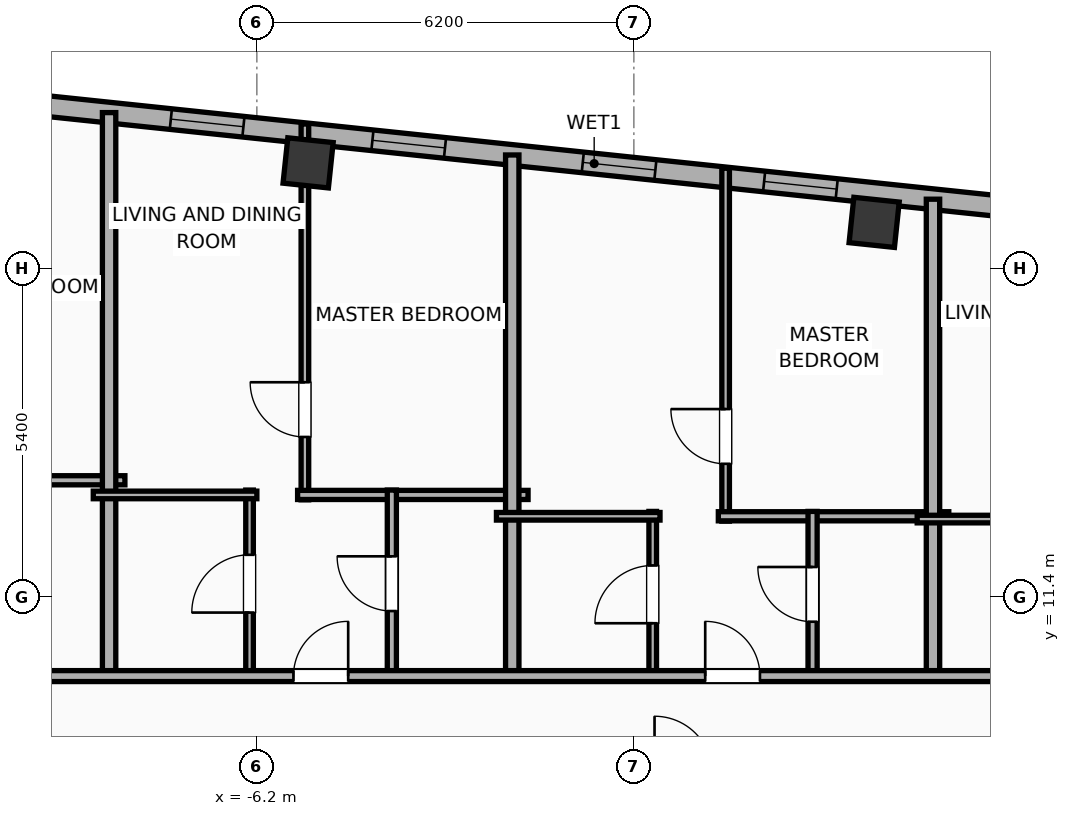
"""IFC4 building model, lengths in metres.
Left out: names, types, materials, properties, quantities, classifications, styles, units other than length and angle.
Written with IfcOpenShell. Run it as: python <this file> out.ifc"""

import sys

from ifc_helpers import new_model, si_unit, direction, frame, frame_2d, origin, origin_2d, place, context, subcontext, project, spatial, rectangle, hollow_rectangle, extrude, element, fill, save


model = new_model("IFC4")
c1 = context("Model", 3, precision=1e-05, world=origin(), true_north=direction((0.0, 1.0)))
c2 = subcontext(c1, "Body", "Model", "MODEL_VIEW")
j1 = project(units=[si_unit("LENGTHUNIT", "METRE"), si_unit("PLANEANGLEUNIT", "RADIAN")], contexts=[c1])
p1 = place(None, origin())
s1 = spatial("IfcSite", under=j1, at=p1, CompositionType="ELEMENT")
p2 = place(p1, origin())
s2 = spatial("IfcBuilding", under=s1, at=p2, CompositionType="ELEMENT")
p3 = place(p2, frame((0.0, 0.0, 299.0)))
s3 = spatial("IfcBuildingStorey", under=s2, at=p3, CompositionType="ELEMENT", Elevation=299.0)
for number, where, z_axis, x_axis in (
    (1, (3.952, 17.561, 0.0), (0.0, 0.0, 1.0), (0.995, -0.105, 0.0)),
    (2, (-5.357, 18.54, 0.0), (0.0, 0.0, 1.0), (0.995, -0.105, 0.0)),
):
    element("IfcColumn", number, at=place(p3, frame(where, z_axis=z_axis, x_axis=x_axis)), inside=s3, PredefinedType="COLUMN", context=c2, shape_type="SweptSolid", body=[
        extrude(hollow_rectangle(XDim=0.75, YDim=0.75, WallThickness=0.025, at=origin_2d()), origin(), (0.0, 0.0, 1.0), 3.9),
    ])
p4 = place(p3, frame((-23.908, 20.972, 0.0), z_axis=(0.0, 0.0, 1.0), x_axis=(0.994521888554, -0.104528528102, 0.0)))
e3 = element("IfcWall", 3, at=p4, inside=s3, PredefinedType="ELEMENTEDWALL", context=c2, shape_type="SweptSolid", body=[
    extrude(rectangle(XDim=46.766, YDim=0.34, at=frame_2d((23.383, 0.0))), origin(), (0.0, 0.0, 1.0), 3.635),
])
p5 = place(p4, frame((5.644, 0.0, 0.65)))
e4 = element("IfcOpeningElement", 4, at=p5, cuts=e3, PredefinedType="OPENING", context=c2, shape_type="SweptSolid", body=[
    extrude(rectangle(XDim=2.6, YDim=2.45, at=frame_2d((1.3, 1.225))), frame((0.0, 0.18, 0.0), z_axis=(0.0, -1.0, 0.0), x_axis=(1.0, 0.0, 0.0)), (0.0, 0.0, 1.0), 0.36),
])
p6 = place(p4, frame((3.05, 0.0, 0.75)))
e5 = element("IfcOpeningElement", 5, at=p6, cuts=e3, PredefinedType="OPENING", context=c2, shape_type="SweptSolid", body=[
    extrude(rectangle(XDim=1.2, YDim=2.05, at=frame_2d((0.6, 1.025))), frame((0.0, 0.18, 0.0), z_axis=(0.0, -1.0, 0.0), x_axis=(1.0, 0.0, 0.0)), (0.0, 0.0, 1.0), 0.36),
])
p7 = place(p4, frame((9.957, 0.0, 0.75)))
e6 = element("IfcOpeningElement", 6, at=p7, cuts=e3, PredefinedType="OPENING", context=c2, shape_type="SweptSolid", body=[
    extrude(rectangle(XDim=1.2, YDim=2.05, at=frame_2d((0.6, 1.025))), frame((0.0, 0.18, 0.0), z_axis=(0.0, -1.0, 0.0), x_axis=(1.0, 0.0, 0.0)), (0.0, 0.0, 1.0), 0.36),
])
p8 = place(p4, frame((13.05, 0.0, 0.75)))
e7 = element("IfcOpeningElement", 7, at=p8, cuts=e3, PredefinedType="OPENING", context=c2, shape_type="SweptSolid", body=[
    extrude(rectangle(XDim=1.2, YDim=2.05, at=frame_2d((0.6, 1.025))), frame((0.0, 0.18, 0.0), z_axis=(0.0, -1.0, 0.0), x_axis=(1.0, 0.0, 0.0)), (0.0, 0.0, 1.0), 0.36),
])
p9 = place(p4, frame((16.383, 0.0, 0.75)))
e8 = element("IfcOpeningElement", 8, at=p9, cuts=e3, PredefinedType="OPENING", context=c2, shape_type="SweptSolid", body=[
    extrude(rectangle(XDim=1.2, YDim=2.05, at=frame_2d((0.6, 1.025))), frame((0.0, 0.18, 0.0), z_axis=(0.0, -1.0, 0.0), x_axis=(1.0, 0.0, 0.0)), (0.0, 0.0, 1.0), 0.36),
])
p10 = place(p4, frame((19.716, 0.0, 0.75)))
e9 = element("IfcOpeningElement", 9, at=p10, cuts=e3, PredefinedType="OPENING", context=c2, shape_type="SweptSolid", body=[
    extrude(rectangle(XDim=1.2, YDim=2.05, at=frame_2d((0.6, 1.025))), frame((0.0, 0.18, 0.0), z_axis=(0.0, -1.0, 0.0), x_axis=(1.0, 0.0, 0.0)), (0.0, 0.0, 1.0), 0.36),
])
p11 = place(p4, frame((23.195, 0.0, 0.75)))
e10 = element("IfcOpeningElement", 10, at=p11, cuts=e3, PredefinedType="OPENING", context=c2, shape_type="SweptSolid", body=[
    extrude(rectangle(XDim=1.2, YDim=2.05, at=frame_2d((0.6, 1.025))), frame((0.0, 0.18, 0.0), z_axis=(0.0, -1.0, 0.0), x_axis=(1.0, 0.0, 0.0)), (0.0, 0.0, 1.0), 0.36),
])
p12 = place(p4, frame((26.194, 0.0, 0.75)))
e11 = element("IfcOpeningElement", 11, at=p12, cuts=e3, PredefinedType="OPENING", context=c2, shape_type="SweptSolid", body=[
    extrude(rectangle(XDim=1.2, YDim=2.05, at=frame_2d((0.6, 1.025))), frame((0.0, 0.18, 0.0), z_axis=(0.0, -1.0, 0.0), x_axis=(1.0, 0.0, 0.0)), (0.0, 0.0, 1.0), 0.36),
])
p13 = place(p4, frame((30.152, 0.0, 0.75)))
e12 = element("IfcOpeningElement", 12, at=p13, cuts=e3, PredefinedType="OPENING", context=c2, shape_type="SweptSolid", body=[
    extrude(rectangle(XDim=1.2, YDim=2.05, at=frame_2d((0.6, 1.025))), frame((0.0, 0.18, 0.0), z_axis=(0.0, -1.0, 0.0), x_axis=(1.0, 0.0, 0.0)), (0.0, 0.0, 1.0), 0.36),
])
p14 = place(p4, frame((33.631, 0.0, 0.75)))
e13 = element("IfcOpeningElement", 13, at=p14, cuts=e3, PredefinedType="OPENING", context=c2, shape_type="SweptSolid", body=[
    extrude(rectangle(XDim=1.2, YDim=2.05, at=frame_2d((0.6, 1.025))), frame((0.0, 0.18, 0.0), z_axis=(0.0, -1.0, 0.0), x_axis=(1.0, 0.0, 0.0)), (0.0, 0.0, 1.0), 0.36),
])
p15 = place(p4, frame((38.07, 0.0, 0.75)))
e14 = element("IfcOpeningElement", 14, at=p15, cuts=e3, PredefinedType="OPENING", context=c2, shape_type="SweptSolid", body=[
    extrude(rectangle(XDim=1.2, YDim=2.05, at=frame_2d((0.6, 1.025))), frame((0.0, 0.18, 0.0), z_axis=(0.0, -1.0, 0.0), x_axis=(1.0, 0.0, 0.0)), (0.0, 0.0, 1.0), 0.36),
])
p16 = place(p4, frame((40.589, 0.0, 0.75)))
e15 = element("IfcOpeningElement", 15, at=p16, cuts=e3, PredefinedType="OPENING", context=c2, shape_type="SweptSolid", body=[
    extrude(rectangle(XDim=1.2, YDim=2.05, at=frame_2d((0.6, 1.025))), frame((0.0, 0.18, 0.0), z_axis=(0.0, -1.0, 0.0), x_axis=(1.0, 0.0, 0.0)), (0.0, 0.0, 1.0), 0.36),
])
p17 = place(p4, frame((43.789, 0.0, 0.75)))
e16 = element("IfcOpeningElement", 16, at=p17, cuts=e3, PredefinedType="OPENING", context=c2, shape_type="SweptSolid", body=[
    extrude(rectangle(XDim=1.2, YDim=2.05, at=frame_2d((0.6, 1.025))), frame((0.0, 0.18, 0.0), z_axis=(0.0, -1.0, 0.0), x_axis=(1.0, 0.0, 0.0)), (0.0, 0.0, 1.0), 0.36),
])
p18 = place(p3, frame((-12.16, 13.32, 0.0), z_axis=(0.0, 0.0, 1.0), x_axis=(1.0, 0.0, 0.0)))
e17 = element("IfcWall", 17, at=p18, inside=s3, PredefinedType="PLUMBINGWALL", context=c2, shape_type="SweptSolid", body=[
    extrude(rectangle(XDim=3.79, YDim=0.15, at=frame_2d((1.895, 0.0))), origin(), (0.0, 0.0, 1.0), 3.635),
])
p19 = place(p3, frame((-8.63, 10.02, 0.0), z_axis=(0.0, 0.0, 1.0), x_axis=(0.0, 1.0, 0.0)))
e18 = element("IfcWall", 18, at=p19, inside=s3, PredefinedType="PARTITIONING", context=c2, shape_type="SweptSolid", body=[
    extrude(rectangle(XDim=9.346, YDim=0.22, at=frame_2d((4.673, 0.0))), origin(), (0.0, 0.0, 1.0), 3.635),
])
p20 = place(p3, frame((-5.41, 12.999, 0.0), z_axis=(0.0, 0.0, 1.0), x_axis=(0.0, 1.0, 0.0)))
e19 = element("IfcWall", 19, at=p20, inside=s3, PredefinedType="PARTITIONING", context=c2, shape_type="SweptSolid", body=[
    extrude(rectangle(XDim=6.18, YDim=0.125, at=frame_2d((3.09, 0.0))), origin(), (0.0, 0.0, 1.0), 3.075),
])
p21 = place(p20, frame((1.033, 0.0, 0.0)))
e20 = element("IfcOpeningElement", 20, at=p21, cuts=e19, PredefinedType="OPENING", context=c2, shape_type="SweptSolid", body=[
    extrude(rectangle(XDim=0.9, YDim=2.05, at=frame_2d((0.45, 1.025))), frame((0.0, 0.073, 0.0), z_axis=(0.0, -1.0, 0.0), x_axis=(1.0, 0.0, 0.0)), (0.0, 0.0, 1.0), 0.145),
])
p22 = place(p3, frame((-5.53, 13.079, 0.0), z_axis=(0.0, 0.0, 1.0), x_axis=(1.0, 0.0, 0.0)))
e21 = element("IfcWall", 21, at=p22, inside=s3, PredefinedType="PLUMBINGWALL", context=c2, shape_type="SweptSolid", body=[
    extrude(rectangle(XDim=3.79, YDim=0.15, at=frame_2d((1.895, 0.0))), origin(), (0.0, 0.0, 1.0), 3.635),
])
p23 = place(p3, frame((-6.32, 10.08, 0.0), z_axis=(0.0, 0.0, 1.0), x_axis=(0.0, 1.0, 0.0)))
e22 = element("IfcWall", 22, at=p23, inside=s3, PredefinedType="PARTITIONING", context=c2, shape_type="SweptSolid", body=[
    extrude(rectangle(XDim=3.079, YDim=0.125, at=frame_2d((1.54, 0.0))), origin(), (0.0, 0.0, 1.0), 3.635),
])
p24 = place(p23, frame((1.064, 0.0, 0.0)))
e23 = element("IfcOpeningElement", 23, at=p24, cuts=e22, PredefinedType="OPENING", context=c2, shape_type="SweptSolid", body=[
    extrude(rectangle(XDim=0.95, YDim=2.05, at=frame_2d((0.475, 1.025))), frame((0.0, 0.073, 0.0), z_axis=(0.0, -1.0, 0.0), x_axis=(1.0, 0.0, 0.0)), (0.0, 0.0, 1.0), 0.145),
])
p25 = place(p3, frame((-8.89, 13.079, 0.0), z_axis=(0.0, 0.0, 1.0), x_axis=(1.0, 0.0, 0.0)))
e24 = element("IfcWall", 24, at=p25, inside=s3, PredefinedType="PARTITIONING", context=c2, shape_type="SweptSolid", body=[
    extrude(rectangle(XDim=2.69, YDim=0.125, at=frame_2d((1.345, 0.0))), origin(), (0.0, 0.0, 1.0), 3.635),
])
p26 = place(p3, frame((-3.98, 10.08, 0.0), z_axis=(0.0, 0.0, 1.0), x_axis=(0.0, 1.0, 0.0)))
e25 = element("IfcWall", 25, at=p26, inside=s3, PredefinedType="PLUMBINGWALL", context=c2, shape_type="SweptSolid", body=[
    extrude(rectangle(XDim=3.079, YDim=0.15, at=frame_2d((1.54, 0.0))), origin(), (0.0, 0.0, 1.0), 3.635),
])
p27 = place(p26, frame((1.09, 0.0, 0.0)))
e26 = element("IfcOpeningElement", 26, at=p27, cuts=e25, PredefinedType="OPENING", context=c2, shape_type="SweptSolid", body=[
    extrude(rectangle(XDim=0.9, YDim=2.05, at=frame_2d((0.45, 1.025))), frame((0.0, 0.085, 0.0), z_axis=(0.0, -1.0, 0.0), x_axis=(1.0, 0.0, 0.0)), (0.0, 0.0, 1.0), 0.17),
])
p28 = place(p3, frame((-2.0, 10.02, 0.0), z_axis=(0.0, 0.0, 1.0), x_axis=(0.0, 1.0, 0.0)))
e27 = element("IfcWall", 27, at=p28, inside=s3, PredefinedType="PARTITIONING", context=c2, shape_type="SweptSolid", body=[
    extrude(rectangle(XDim=8.65, YDim=0.22, at=frame_2d((4.325, 0.0))), origin(), (0.0, 0.0, 1.0), 3.635),
])
p29 = place(p3, frame((1.509, 12.648, 0.0), z_axis=(0.0, 0.0, 1.0), x_axis=(0.0, 1.0, 0.0)))
e28 = element("IfcWall", 28, at=p29, inside=s3, PredefinedType="PARTITIONING", context=c2, shape_type="SweptSolid", body=[
    extrude(rectangle(XDim=5.804, YDim=0.125, at=frame_2d((2.902, 0.0))), origin(), (0.0, 0.0, 1.0), 3.635),
])
p30 = place(p29, frame((0.943, 0.0, 0.0)))
e29 = element("IfcOpeningElement", 29, at=p30, cuts=e28, PredefinedType="OPENING", context=c2, shape_type="SweptSolid", body=[
    extrude(rectangle(XDim=0.9, YDim=2.05, at=frame_2d((0.45, 1.025))), frame((0.0, 0.073, 0.0), z_axis=(0.0, -1.0, 0.0), x_axis=(1.0, 0.0, 0.0)), (0.0, 0.0, 1.0), 0.145),
])
p31 = place(p3, frame((1.389, 12.728, 0.0), z_axis=(0.0, 0.0, 1.0), x_axis=(1.0, 0.0, 0.0)))
e30 = element("IfcWall", 30, at=p31, inside=s3, PredefinedType="PLUMBINGWALL", context=c2, shape_type="SweptSolid", body=[
    extrude(rectangle(XDim=3.79, YDim=0.15, at=frame_2d((1.895, 0.0))), origin(), (0.0, 0.0, 1.0), 3.635),
])
p32 = place(p3, frame((0.31, 10.08, 0.0), z_axis=(0.0, 0.0, 1.0), x_axis=(0.0, 1.0, 0.0)))
e31 = element("IfcWall", 31, at=p32, inside=s3, PredefinedType="PARTITIONING", context=c2, shape_type="SweptSolid", body=[
    extrude(rectangle(XDim=2.728, YDim=0.125, at=frame_2d((1.364, 0.0))), origin(), (0.0, 0.0, 1.0), 3.635),
])
p33 = place(p32, frame((0.889, 0.0, 0.0)))
e32 = element("IfcOpeningElement", 32, at=p33, cuts=e31, PredefinedType="OPENING", context=c2, shape_type="SweptSolid", body=[
    extrude(rectangle(XDim=0.95, YDim=2.05, at=frame_2d((0.475, 1.025))), frame((0.0, 0.073, 0.0), z_axis=(0.0, -1.0, 0.0), x_axis=(1.0, 0.0, 0.0)), (0.0, 0.0, 1.0), 0.145),
])
p34 = place(p3, frame((-2.26, 12.728, 0.0), z_axis=(0.0, 0.0, 1.0), x_axis=(1.0, 0.0, 0.0)))
e33 = element("IfcWall", 33, at=p34, inside=s3, PredefinedType="PARTITIONING", context=c2, shape_type="SweptSolid", body=[
    extrude(rectangle(XDim=2.69, YDim=0.125, at=frame_2d((1.345, 0.0))), origin(), (0.0, 0.0, 1.0), 3.635),
])
p35 = place(p3, frame((2.939, 10.08, 0.0), z_axis=(0.0, 0.0, 1.0), x_axis=(0.0, 1.0, 0.0)))
e34 = element("IfcWall", 34, at=p35, inside=s3, PredefinedType="PLUMBINGWALL", context=c2, shape_type="SweptSolid", body=[
    extrude(rectangle(XDim=2.728, YDim=0.15, at=frame_2d((1.364, 0.0))), origin(), (0.0, 0.0, 1.0), 3.635),
])
p36 = place(p35, frame((0.914, 0.0, 0.0)))
e35 = element("IfcOpeningElement", 35, at=p36, cuts=e34, PredefinedType="OPENING", context=c2, shape_type="SweptSolid", body=[
    extrude(rectangle(XDim=0.9, YDim=2.05, at=frame_2d((0.45, 1.025))), frame((0.0, 0.085, 0.0), z_axis=(0.0, -1.0, 0.0), x_axis=(1.0, 0.0, 0.0)), (0.0, 0.0, 1.0), 0.17),
])
p37 = place(p3, frame((4.919, 10.02, 0.0), z_axis=(0.0, 0.0, 1.0), x_axis=(0.0, 1.0, 0.0)))
e36 = element("IfcWall", 36, at=p37, inside=s3, PredefinedType="PARTITIONING", context=c2, shape_type="SweptSolid", body=[
    extrude(rectangle(XDim=7.922, YDim=0.22, at=frame_2d((3.961, 0.0))), origin(), (0.0, 0.0, 1.0), 3.635),
])
p38 = place(p3, frame((4.659, 12.682, 0.0), z_axis=(0.0, 0.0, 1.0), x_axis=(1.0, 0.0, 0.0)))
e37 = element("IfcWall", 37, at=p38, inside=s3, PredefinedType="PARTITIONING", context=c2, shape_type="SweptSolid", body=[
    extrude(rectangle(XDim=2.69, YDim=0.125, at=frame_2d((1.345, 0.0))), origin(), (0.0, 0.0, 1.0), 3.635),
])
p39 = place(p3, frame((-28.516, 10.1, 0.0), z_axis=(0.0, 0.0, 1.0), x_axis=(1.0, 0.0, 0.0)))
e38 = element("IfcWall", 38, at=p39, inside=s3, PredefinedType="PARTITIONING", context=c2, shape_type="SweptSolid", body=[
    extrude(rectangle(XDim=53.955, YDim=0.18, at=frame_2d((26.978, 0.0))), origin(), (0.0, 0.0, 1.0), 3.635),
])
p40 = place(p39, frame((2.998, 0.0, 0.0)))
e39 = element("IfcOpeningElement", 39, at=p40, cuts=e38, PredefinedType="OPENING", context=c2, shape_type="SweptSolid", body=[
    extrude(rectangle(XDim=0.9, YDim=2.05, at=frame_2d((0.45, 1.025))), frame((0.0, 0.1, 0.0), z_axis=(0.0, -1.0, 0.0), x_axis=(1.0, 0.0, 0.0)), (0.0, 0.0, 1.0), 0.2),
])
p41 = place(p39, frame((9.656, 0.0, 0.0)))
e40 = element("IfcOpeningElement", 40, at=p41, cuts=e38, PredefinedType="OPENING", context=c2, shape_type="SweptSolid", body=[
    extrude(rectangle(XDim=0.9, YDim=2.05, at=frame_2d((0.45, 1.025))), frame((0.0, 0.1, 0.0), z_axis=(0.0, -1.0, 0.0), x_axis=(1.0, 0.0, 0.0)), (0.0, 0.0, 1.0), 0.2),
])
p42 = place(p39, frame((16.287, 0.0, 0.0)))
e41 = element("IfcOpeningElement", 41, at=p42, cuts=e38, PredefinedType="OPENING", context=c2, shape_type="SweptSolid", body=[
    extrude(rectangle(XDim=0.9, YDim=2.05, at=frame_2d((0.45, 1.025))), frame((0.0, 0.1, 0.0), z_axis=(0.0, -1.0, 0.0), x_axis=(1.0, 0.0, 0.0)), (0.0, 0.0, 1.0), 0.2),
])
p43 = place(p39, frame((22.918, 0.0, 0.0)))
e42 = element("IfcOpeningElement", 42, at=p43, cuts=e38, PredefinedType="OPENING", context=c2, shape_type="SweptSolid", body=[
    extrude(rectangle(XDim=0.9, YDim=2.05, at=frame_2d((0.45, 1.025))), frame((0.0, 0.1, 0.0), z_axis=(0.0, -1.0, 0.0), x_axis=(1.0, 0.0, 0.0)), (0.0, 0.0, 1.0), 0.2),
])
p44 = place(p39, frame((29.689, 0.0, 0.0)))
e43 = element("IfcOpeningElement", 43, at=p44, cuts=e38, PredefinedType="OPENING", context=c2, shape_type="SweptSolid", body=[
    extrude(rectangle(XDim=0.9, YDim=2.05, at=frame_2d((0.45, 1.025))), frame((0.0, 0.1, 0.0), z_axis=(0.0, -1.0, 0.0), x_axis=(1.0, 0.0, 0.0)), (0.0, 0.0, 1.0), 0.2),
])
p45 = place(p39, frame((36.612, 0.0, 0.0)))
e44 = element("IfcOpeningElement", 44, at=p45, cuts=e38, PredefinedType="OPENING", context=c2, shape_type="SweptSolid", body=[
    extrude(rectangle(XDim=0.9, YDim=2.05, at=frame_2d((0.45, 1.025))), frame((0.0, 0.1, 0.0), z_axis=(0.0, -1.0, 0.0), x_axis=(1.0, 0.0, 0.0)), (0.0, 0.0, 1.0), 0.2),
])
p46 = place(p39, frame((43.529, 0.0, 0.0)))
e45 = element("IfcOpeningElement", 45, at=p46, cuts=e38, PredefinedType="OPENING", context=c2, shape_type="SweptSolid", body=[
    extrude(rectangle(XDim=0.9, YDim=2.05, at=frame_2d((0.45, 1.025))), frame((0.0, 0.1, 0.0), z_axis=(0.0, -1.0, 0.0), x_axis=(1.0, 0.0, 0.0)), (0.0, 0.0, 1.0), 0.2),
])
p47 = place(p39, frame((50.452, 0.0, 0.0)))
e46 = element("IfcOpeningElement", 46, at=p47, cuts=e38, PredefinedType="OPENING", context=c2, shape_type="SweptSolid", body=[
    extrude(rectangle(XDim=0.9, YDim=2.05, at=frame_2d((0.45, 1.025))), frame((0.0, 0.1, 0.0), z_axis=(0.0, -1.0, 0.0), x_axis=(1.0, 0.0, 0.0)), (0.0, 0.0, 1.0), 0.2),
])
p48 = place(p9, origin())
e47 = element("IfcWindow", 47, at=p48, inside=s3, PartitioningType="SINGLE_PANEL", PredefinedType="WINDOW", context=c2, shape_type="SweptSolid", body=[
    extrude(rectangle(XDim=1.2, YDim=2.05, at=frame_2d((0.6, 1.025))), frame((0.0, 0.03, 0.0), z_axis=(0.0, -1.0, 0.0), x_axis=(1.0, 0.0, 0.0)), (0.0, 0.0, 1.0), 0.06),
])
fill(e8, e47)
p49 = place(p10, origin())
e48 = element("IfcWindow", 48, at=p49, inside=s3, PartitioningType="SINGLE_PANEL", PredefinedType="WINDOW", context=c2, shape_type="SweptSolid", body=[
    extrude(rectangle(XDim=1.2, YDim=2.05, at=frame_2d((0.6, 1.025))), frame((0.0, 0.03, 0.0), z_axis=(0.0, -1.0, 0.0), x_axis=(1.0, 0.0, 0.0)), (0.0, 0.0, 1.0), 0.06),
])
fill(e9, e48)
p50 = place(p11, origin())
e49 = element("IfcWindow", 49, at=p50, inside=s3, PartitioningType="SINGLE_PANEL", PredefinedType="WINDOW", context=c2, shape_type="SweptSolid", body=[
    extrude(rectangle(XDim=1.2, YDim=2.05, at=frame_2d((0.6, 1.025))), frame((0.0, 0.03, 0.0), z_axis=(0.0, -1.0, 0.0), x_axis=(1.0, 0.0, 0.0)), (0.0, 0.0, 1.0), 0.06),
])
fill(e10, e49)
p51 = place(p12, origin())
e50 = element("IfcWindow", 50, at=p51, inside=s3, PartitioningType="SINGLE_PANEL", PredefinedType="WINDOW", context=c2, shape_type="SweptSolid", body=[
    extrude(rectangle(XDim=1.2, YDim=2.05, at=frame_2d((0.6, 1.025))), frame((0.0, 0.03, 0.0), z_axis=(0.0, -1.0, 0.0), x_axis=(1.0, 0.0, 0.0)), (0.0, 0.0, 1.0), 0.06),
])
fill(e11, e50)
p52 = place(p21, origin())
e51 = element("IfcDoor", 51, at=p52, inside=s3, OperationType="SINGLE_SWING_RIGHT", PredefinedType="DOOR", context=c2, shape_type="SweptSolid", body=[
    extrude(rectangle(XDim=0.9, YDim=2.05, at=frame_2d((0.45, 1.025))), frame((0.0, 0.025, 0.0), z_axis=(0.0, -1.0, 0.0), x_axis=(1.0, 0.0, 0.0)), (0.0, 0.0, 1.0), 0.05),
])
fill(e20, e51)
p53 = place(p24, origin())
e52 = element("IfcDoor", 52, at=p53, inside=s3, OperationType="SINGLE_SWING_LEFT", PredefinedType="DOOR", context=c2, shape_type="SweptSolid", body=[
    extrude(rectangle(XDim=0.95, YDim=2.05, at=frame_2d((0.475, 1.025))), frame((0.0, 0.025, 0.0), z_axis=(0.0, -1.0, 0.0), x_axis=(1.0, 0.0, 0.0)), (0.0, 0.0, 1.0), 0.05),
])
fill(e23, e52)
p54 = place(p27, origin())
e53 = element("IfcDoor", 53, at=p54, inside=s3, OperationType="SINGLE_SWING_RIGHT", PredefinedType="DOOR", context=c2, shape_type="SweptSolid", body=[
    extrude(rectangle(XDim=0.9, YDim=2.05, at=frame_2d((0.45, 1.025))), frame((0.0, 0.025, 0.0), z_axis=(0.0, -1.0, 0.0), x_axis=(1.0, 0.0, 0.0)), (0.0, 0.0, 1.0), 0.05),
])
fill(e26, e53)
p55 = place(p30, origin())
e54 = element("IfcDoor", 54, at=p55, inside=s3, OperationType="SINGLE_SWING_RIGHT", PredefinedType="DOOR", context=c2, shape_type="SweptSolid", body=[
    extrude(rectangle(XDim=0.9, YDim=2.05, at=frame_2d((0.45, 1.025))), frame((0.0, 0.025, 0.0), z_axis=(0.0, -1.0, 0.0), x_axis=(1.0, 0.0, 0.0)), (0.0, 0.0, 1.0), 0.05),
])
fill(e29, e54)
p56 = place(p33, origin())
e55 = element("IfcDoor", 55, at=p56, inside=s3, OperationType="SINGLE_SWING_LEFT", PredefinedType="DOOR", context=c2, shape_type="SweptSolid", body=[
    extrude(rectangle(XDim=0.95, YDim=2.05, at=frame_2d((0.475, 1.025))), frame((0.0, 0.025, 0.0), z_axis=(0.0, -1.0, 0.0), x_axis=(1.0, 0.0, 0.0)), (0.0, 0.0, 1.0), 0.05),
])
fill(e32, e55)
p57 = place(p36, origin())
e56 = element("IfcDoor", 56, at=p57, inside=s3, OperationType="SINGLE_SWING_RIGHT", PredefinedType="DOOR", context=c2, shape_type="SweptSolid", body=[
    extrude(rectangle(XDim=0.9, YDim=2.05, at=frame_2d((0.45, 1.025))), frame((0.0, 0.025, 0.0), z_axis=(0.0, -1.0, 0.0), x_axis=(1.0, 0.0, 0.0)), (0.0, 0.0, 1.0), 0.05),
])
fill(e35, e56)
p58 = place(p43, origin())
e57 = element("IfcDoor", 57, at=p58, inside=s3, OperationType="SINGLE_SWING_RIGHT", PredefinedType="DOOR", context=c2, shape_type="SweptSolid", body=[
    extrude(rectangle(XDim=0.9, YDim=2.05, at=frame_2d((0.45, 1.025))), frame((0.0, 0.025, 0.0), z_axis=(0.0, -1.0, 0.0), x_axis=(1.0, 0.0, 0.0)), (0.0, 0.0, 1.0), 0.05),
])
fill(e42, e57)
p59 = place(p44, origin())
e58 = element("IfcDoor", 58, at=p59, inside=s3, OperationType="SINGLE_SWING_LEFT", PredefinedType="DOOR", context=c2, shape_type="SweptSolid", body=[
    extrude(rectangle(XDim=0.9, YDim=2.05, at=frame_2d((0.45, 1.025))), frame((0.0, 0.025, 0.0), z_axis=(0.0, -1.0, 0.0), x_axis=(1.0, 0.0, 0.0)), (0.0, 0.0, 1.0), 0.05),
])
fill(e43, e58)
save(model, sys.argv[1])
